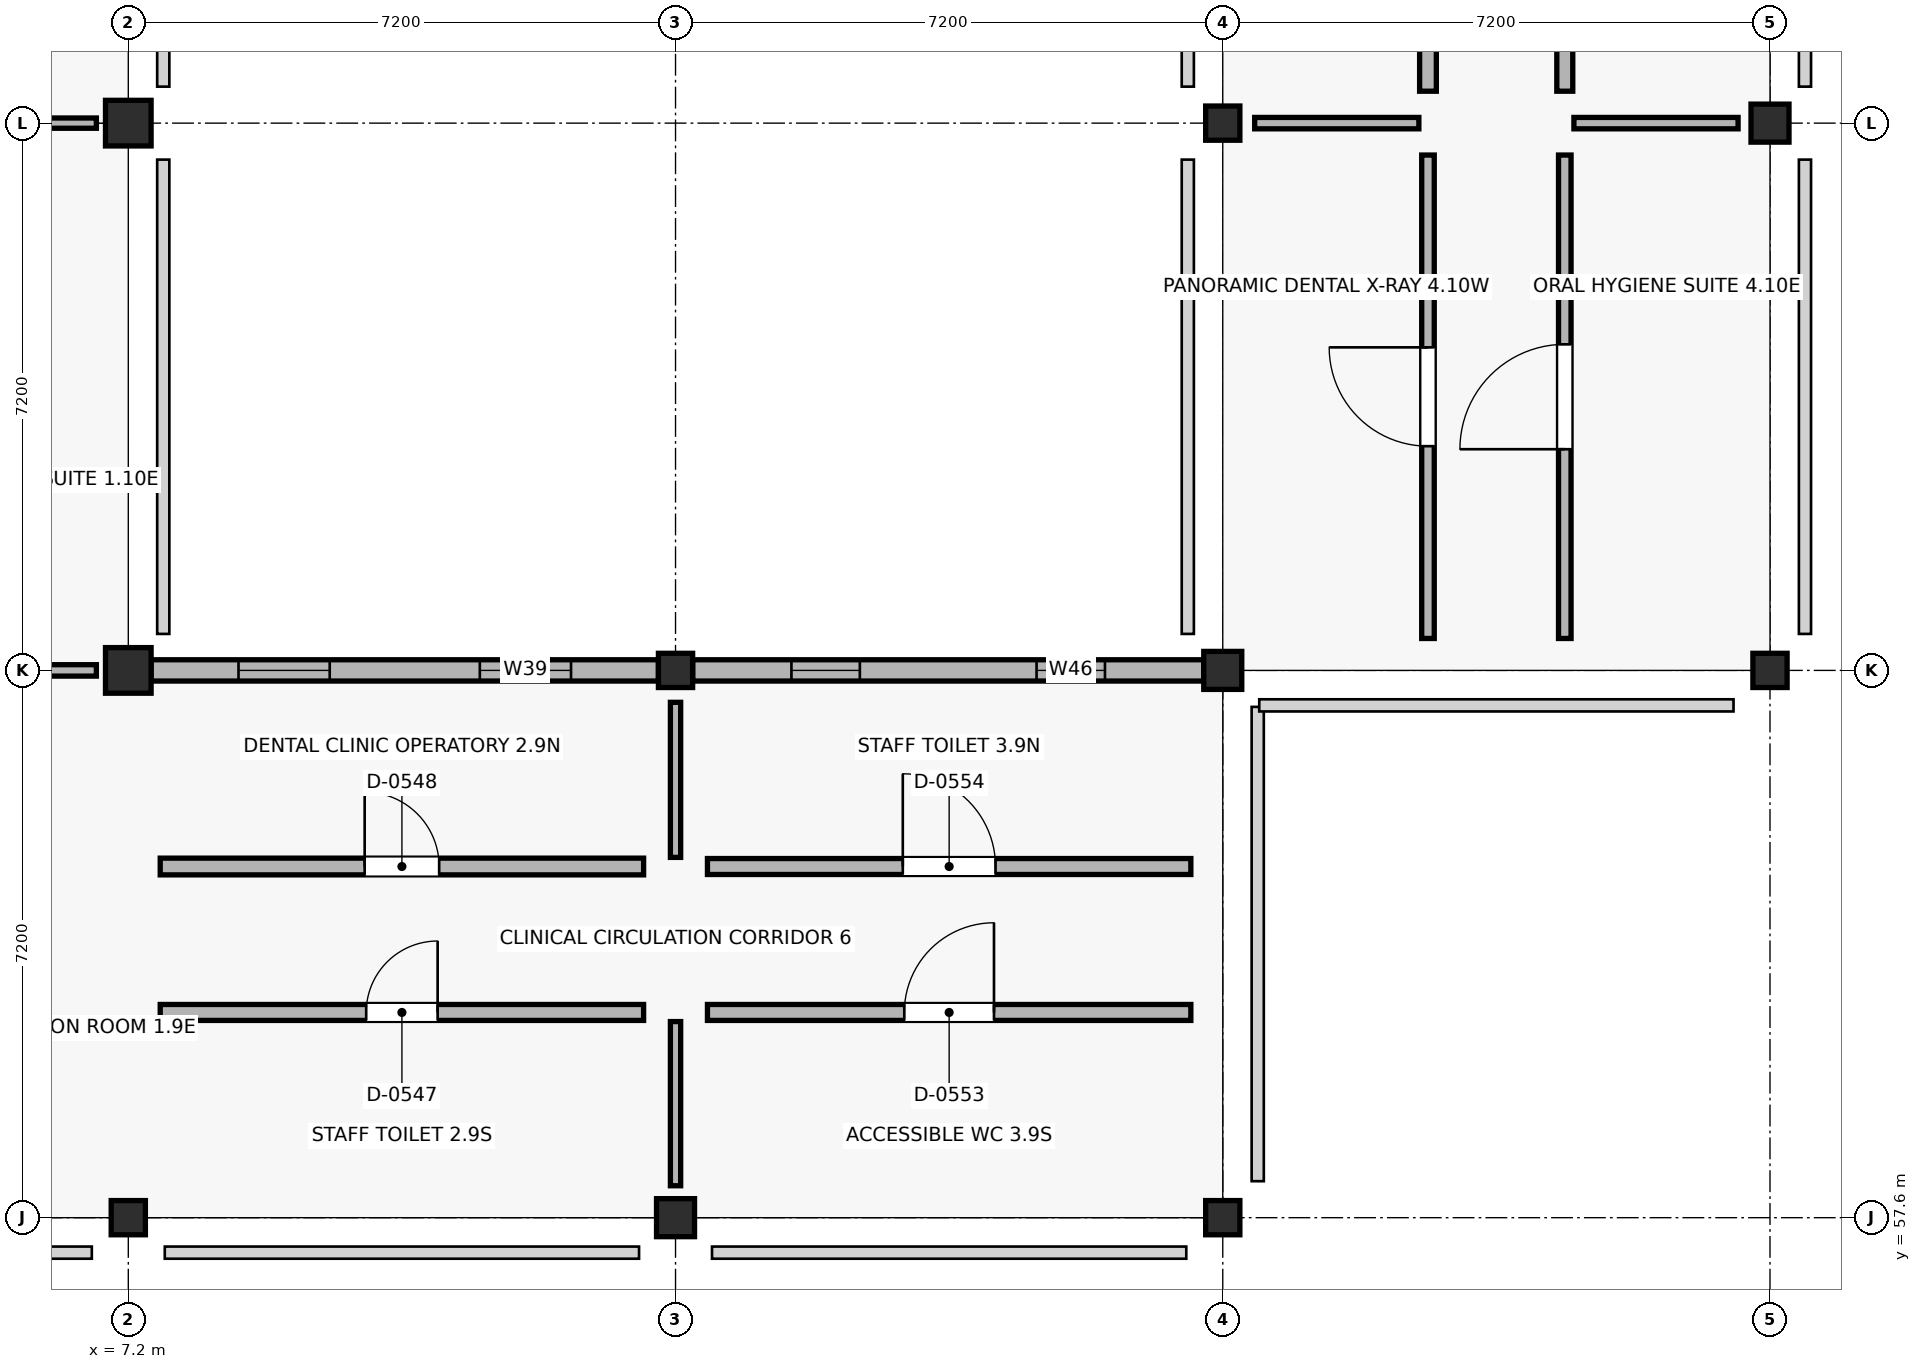
"""IFC4 building model, lengths in metres.
Left out: names, types, materials, properties, quantities, classifications, styles, units other than length and angle.
Written with IfcOpenShell. Run it as: python <this file> out.ifc"""

import sys

from ifc_helpers import new_model, si_unit, direction, frame, frame_2d, origin, origin_2d, place, context, subcontext, project, spatial, rectangle, extrude, element, fill, save


model = new_model("IFC4")
c1 = context("Model", 3, precision=1e-05, world=origin(), true_north=direction((0.0, 1.0)))
c2 = subcontext(c1, "Body", "Model", "MODEL_VIEW")
j1 = project(units=[si_unit("LENGTHUNIT", "METRE"), si_unit("PLANEANGLEUNIT", "RADIAN")], contexts=[c1])
p1 = place(None, origin())
s1 = spatial("IfcSite", under=j1, at=p1, CompositionType="ELEMENT")
p2 = place(p1, origin())
s2 = spatial("IfcBuilding", under=s1, at=p2, CompositionType="ELEMENT")
p3 = place(p2, frame((0.0, 0.0, 13.5)))
s3 = spatial("IfcBuildingStorey", under=s2, at=p3, CompositionType="ELEMENT", Elevation=13.5)
p4 = place(p3, frame((7.2, 57.6, 0.0), z_axis=(0.0, 0.0, 1.0), x_axis=(1.0, 0.0, 0.0)))
e1 = element("IfcColumn", 1, at=p4, inside=s3, PredefinedType="COLUMN", context=c2, shape_type="SweptSolid", body=[
    extrude(rectangle(XDim=0.45, YDim=0.45, at=origin_2d()), origin(), (0.0, 0.0, 1.0), 3.83),
])
for number, where, z_axis, x_axis in (
    (2, (7.2, 64.8, 0.0), (0.0, 0.0, 1.0), (1.0, 0.0, 0.0)),
    (3, (7.2, 72.0, 0.0), (0.0, 0.0, 1.0), (1.0, 0.0, 0.0)),
):
    element("IfcColumn", number, at=place(p3, frame(where, z_axis=z_axis, x_axis=x_axis)), inside=s3, PredefinedType="COLUMN", context=c2, shape_type="SweptSolid", body=[
        extrude(rectangle(XDim=0.6, YDim=0.6, at=origin_2d()), origin(), (0.0, 0.0, 1.0), 4.05),
    ])
p5 = place(p3, frame((14.4, 57.6, 0.0), z_axis=(0.0, 0.0, 1.0), x_axis=(1.0, 0.0, 0.0)))
e4 = element("IfcColumn", 4, at=p5, inside=s3, PredefinedType="COLUMN", context=c2, shape_type="SweptSolid", body=[
    extrude(rectangle(XDim=0.5, YDim=0.5, at=origin_2d()), origin(), (0.0, 0.0, 1.0), 3.83),
])
for number, where, z_axis, x_axis in (
    (5, (14.4, 64.8, 0.0), (0.0, 0.0, 1.0), (1.0, 0.0, 0.0)),
    (6, (21.6, 57.6, 0.0), (0.0, 0.0, 1.0), (1.0, 0.0, 0.0)),
):
    element("IfcColumn", number, at=place(p3, frame(where, z_axis=z_axis, x_axis=x_axis)), inside=s3, PredefinedType="COLUMN", context=c2, shape_type="SweptSolid", body=[
        extrude(rectangle(XDim=0.45, YDim=0.45, at=origin_2d()), origin(), (0.0, 0.0, 1.0), 3.83),
    ])
p6 = place(p3, frame((21.6, 64.8, 0.0), z_axis=(0.0, 0.0, 1.0), x_axis=(1.0, 0.0, 0.0)))
e7 = element("IfcColumn", 7, at=p6, inside=s3, PredefinedType="COLUMN", context=c2, shape_type="SweptSolid", body=[
    extrude(rectangle(XDim=0.5, YDim=0.5, at=origin_2d()), origin(), (0.0, 0.0, 1.0), 3.83),
])
for number, where, z_axis, x_axis in (
    (8, (21.6, 72.0, 0.0), (0.0, 0.0, 1.0), (1.0, 0.0, 0.0)),
    (9, (28.8, 64.8, 0.0), (0.0, 0.0, 1.0), (1.0, 0.0, 0.0)),
):
    element("IfcColumn", number, at=place(p3, frame(where, z_axis=z_axis, x_axis=x_axis)), inside=s3, PredefinedType="COLUMN", context=c2, shape_type="SweptSolid", body=[
        extrude(rectangle(XDim=0.45, YDim=0.45, at=origin_2d()), origin(), (0.0, 0.0, 1.0), 3.83),
    ])
p7 = place(p3, frame((28.8, 72.0, 0.0), z_axis=(0.0, 0.0, 1.0), x_axis=(1.0, 0.0, 0.0)))
e10 = element("IfcColumn", 10, at=p7, inside=s3, PredefinedType="COLUMN", context=c2, shape_type="SweptSolid", body=[
    extrude(rectangle(XDim=0.5, YDim=0.5, at=origin_2d()), origin(), (0.0, 0.0, 1.0), 3.83),
])
p8 = place(p3, frame((14.175, 64.8, 0.0), z_axis=(0.0, 0.0, 1.0), x_axis=(-1.0, 0.0, 0.0)))
e11 = element("IfcWall", 11, at=p8, inside=s3, PredefinedType="STANDARD", context=c2, shape_type="SweptSolid", body=[
    extrude(rectangle(XDim=6.675, YDim=0.28, at=frame_2d((3.337, 0.0))), origin(), (0.0, 0.0, 1.0), 3.14),
])
p9 = place(p8, frame((1.15, 0.0, 0.9)))
e12 = element("IfcOpeningElement", 12, at=p9, cuts=e11, PredefinedType="OPENING", context=c2, shape_type="SweptSolid", body=[
    extrude(rectangle(XDim=1.2, YDim=1.75, at=frame_2d((0.6, 0.875))), frame((0.0, 0.15, 0.0), z_axis=(0.0, -1.0, 0.0), x_axis=(1.0, 0.0, 0.0)), (0.0, 0.0, 1.0), 0.3),
])
p10 = place(p8, frame((4.325, 0.0, 0.9)))
e13 = element("IfcOpeningElement", 13, at=p10, cuts=e11, PredefinedType="OPENING", context=c2, shape_type="SweptSolid", body=[
    extrude(rectangle(XDim=1.2, YDim=1.75, at=frame_2d((0.6, 0.875))), frame((0.0, 0.15, 0.0), z_axis=(0.0, -1.0, 0.0), x_axis=(1.0, 0.0, 0.0)), (0.0, 0.0, 1.0), 0.3),
])
p11 = place(p3, frame((21.35, 64.8, 0.0), z_axis=(0.0, 0.0, 1.0), x_axis=(-1.0, 0.0, 0.0)))
e14 = element("IfcWall", 14, at=p11, inside=s3, PredefinedType="STANDARD", context=c2, shape_type="SweptSolid", body=[
    extrude(rectangle(XDim=6.725, YDim=0.28, at=frame_2d((3.363, 0.0))), origin(), (0.0, 0.0, 1.0), 3.14),
])
p12 = place(p11, frame((1.3, 0.0, 0.9)))
e15 = element("IfcOpeningElement", 15, at=p12, cuts=e14, PredefinedType="OPENING", context=c2, shape_type="SweptSolid", body=[
    extrude(rectangle(XDim=0.9, YDim=1.88, at=frame_2d((0.45, 0.94))), frame((0.0, 0.15, 0.0), z_axis=(0.0, -1.0, 0.0), x_axis=(1.0, 0.0, 0.0)), (0.0, 0.0, 1.0), 0.3),
])
p13 = place(p11, frame((4.525, 0.0, 0.9)))
e16 = element("IfcOpeningElement", 16, at=p13, cuts=e14, PredefinedType="OPENING", context=c2, shape_type="SweptSolid", body=[
    extrude(rectangle(XDim=0.9, YDim=1.88, at=frame_2d((0.45, 0.94))), frame((0.0, 0.15, 0.0), z_axis=(0.0, -1.0, 0.0), x_axis=(1.0, 0.0, 0.0)), (0.0, 0.0, 1.0), 0.3),
])
p14 = place(p3, frame((4.62, 64.8, 0.0), z_axis=(0.0, 0.0, 1.0), x_axis=(1.0, 0.0, 0.0)))
e17 = element("IfcWall", 17, at=p14, inside=s3, PredefinedType="PARTITIONING", context=c2, shape_type="SweptSolid", body=[
    extrude(rectangle(XDim=2.16, YDim=0.15, at=frame_2d((1.08, 0.0))), origin(), (0.0, 0.0, 1.0), 2.93),
])
p15 = place(p3, frame((4.62, 72.0, 0.0), z_axis=(0.0, 0.0, 1.0), x_axis=(1.0, 0.0, 0.0)))
e18 = element("IfcWall", 18, at=p15, inside=s3, PredefinedType="PARTITIONING", context=c2, shape_type="SweptSolid", body=[
    extrude(rectangle(XDim=2.16, YDim=0.135, at=frame_2d((1.08, 0.0))), origin(), (0.0, 0.0, 1.0), 2.93),
])
p16 = place(p3, frame((7.62, 60.3, 0.0), z_axis=(0.0, 0.0, 1.0), x_axis=(1.0, 0.0, 0.0)))
e19 = element("IfcWall", 19, at=p16, inside=s3, PredefinedType="PLUMBINGWALL", context=c2, shape_type="SweptSolid", body=[
    extrude(rectangle(XDim=6.36, YDim=0.21, at=frame_2d((3.18, 0.0))), origin(), (0.0, 0.0, 1.0), 2.93),
])
p17 = place(p16, frame((2.71, 0.0, 0.0)))
e20 = element("IfcOpeningElement", 20, at=p17, cuts=e19, PredefinedType="OPENING", context=c2, shape_type="SweptSolid", body=[
    extrude(rectangle(XDim=0.94, YDim=2.19, at=frame_2d((0.47, 1.095))), frame((0.0, 0.115, 0.0), z_axis=(0.0, -1.0, 0.0), x_axis=(1.0, 0.0, 0.0)), (0.0, 0.0, 1.0), 0.23),
])
p18 = place(p3, frame((14.4, 58.02, 0.0), z_axis=(0.0, 0.0, 1.0), x_axis=(0.0, 1.0, 0.0)))
e21 = element("IfcWall", 21, at=p18, inside=s3, PredefinedType="PARTITIONING", context=c2, shape_type="SweptSolid", body=[
    extrude(rectangle(XDim=2.16, YDim=0.135, at=frame_2d((1.08, 0.0))), origin(), (0.0, 0.0, 1.0), 2.93),
])
p19 = place(p3, frame((7.62, 62.22, 0.0), z_axis=(0.0, 0.0, 1.0), x_axis=(1.0, 0.0, 0.0)))
e22 = element("IfcWall", 22, at=p19, inside=s3, PredefinedType="SOLIDWALL", context=c2, shape_type="SweptSolid", body=[
    extrude(rectangle(XDim=6.36, YDim=0.22, at=frame_2d((3.18, 0.0))), origin(), (0.0, 0.0, 1.0), 2.93),
])
p20 = place(p19, frame((2.69, 0.0, 0.0)))
e23 = element("IfcOpeningElement", 23, at=p20, cuts=e22, PredefinedType="OPENING", context=c2, shape_type="SweptSolid", body=[
    extrude(rectangle(XDim=0.98, YDim=2.19, at=frame_2d((0.49, 1.095))), frame((0.0, 0.12, 0.0), z_axis=(0.0, -1.0, 0.0), x_axis=(1.0, 0.0, 0.0)), (0.0, 0.0, 1.0), 0.24),
])
p21 = place(p3, frame((14.4, 62.34, 0.0), z_axis=(0.0, 0.0, 1.0), x_axis=(0.0, 1.0, 0.0)))
e24 = element("IfcWall", 24, at=p21, inside=s3, PredefinedType="PARTITIONING", context=c2, shape_type="SweptSolid", body=[
    extrude(rectangle(XDim=2.04, YDim=0.135, at=frame_2d((1.02, 0.0))), origin(), (0.0, 0.0, 1.0), 2.93),
])
p22 = place(p3, frame((14.82, 60.3, 0.0), z_axis=(0.0, 0.0, 1.0), x_axis=(1.0, 0.0, 0.0)))
e25 = element("IfcWall", 25, at=p22, inside=s3, PredefinedType="PLUMBINGWALL", context=c2, shape_type="SweptSolid", body=[
    extrude(rectangle(XDim=6.36, YDim=0.21, at=frame_2d((3.18, 0.0))), origin(), (0.0, 0.0, 1.0), 2.93),
])
p23 = place(p22, frame((2.59, 0.0, 0.0)))
e26 = element("IfcOpeningElement", 26, at=p23, cuts=e25, PredefinedType="OPENING", context=c2, shape_type="SweptSolid", body=[
    extrude(rectangle(XDim=1.18, YDim=2.19, at=frame_2d((0.59, 1.095))), frame((0.0, 0.115, 0.0), z_axis=(0.0, -1.0, 0.0), x_axis=(1.0, 0.0, 0.0)), (0.0, 0.0, 1.0), 0.23),
])
p24 = place(p3, frame((14.82, 62.22, 0.0), z_axis=(0.0, 0.0, 1.0), x_axis=(1.0, 0.0, 0.0)))
e27 = element("IfcWall", 27, at=p24, inside=s3, PredefinedType="PLUMBINGWALL", context=c2, shape_type="SweptSolid", body=[
    extrude(rectangle(XDim=6.36, YDim=0.21, at=frame_2d((3.18, 0.0))), origin(), (0.0, 0.0, 1.0), 2.93),
])
p25 = place(p24, frame((2.57, 0.0, 0.0)))
e28 = element("IfcOpeningElement", 28, at=p25, cuts=e27, PredefinedType="OPENING", context=c2, shape_type="SweptSolid", body=[
    extrude(rectangle(XDim=1.22, YDim=2.19, at=frame_2d((0.61, 1.095))), frame((0.0, 0.115, 0.0), z_axis=(0.0, -1.0, 0.0), x_axis=(1.0, 0.0, 0.0)), (0.0, 0.0, 1.0), 0.23),
])
p26 = place(p3, frame((24.3, 65.22, 0.0), z_axis=(0.0, 0.0, 1.0), x_axis=(0.0, 1.0, 0.0)))
e29 = element("IfcWall", 29, at=p26, inside=s3, PredefinedType="PARTITIONING", context=c2, shape_type="SweptSolid", body=[
    extrude(rectangle(XDim=6.36, YDim=0.165, at=frame_2d((3.18, 0.0))), origin(), (0.0, 0.0, 1.0), 2.93),
])
p27 = place(p26, frame((2.53, 0.0, 0.0)))
e30 = element("IfcOpeningElement", 30, at=p27, cuts=e29, PredefinedType="OPENING", context=c2, shape_type="SweptSolid", body=[
    extrude(rectangle(XDim=1.3, YDim=2.15, at=frame_2d((0.65, 1.075))), frame((0.0, 0.093, 0.0), z_axis=(0.0, -1.0, 0.0), x_axis=(1.0, 0.0, 0.0)), (0.0, 0.0, 1.0), 0.185),
])
p28 = place(p3, frame((22.02, 72.0, 0.0), z_axis=(0.0, 0.0, 1.0), x_axis=(1.0, 0.0, 0.0)))
e31 = element("IfcWall", 31, at=p28, inside=s3, PredefinedType="PARTITIONING", context=c2, shape_type="SweptSolid", body=[
    extrude(rectangle(XDim=2.16, YDim=0.15, at=frame_2d((1.08, 0.0))), origin(), (0.0, 0.0, 1.0), 2.93),
])
p29 = place(p3, frame((26.1, 65.22, 0.0), z_axis=(0.0, 0.0, 1.0), x_axis=(0.0, 1.0, 0.0)))
e32 = element("IfcWall", 32, at=p29, inside=s3, PredefinedType="PARTITIONING", context=c2, shape_type="SweptSolid", body=[
    extrude(rectangle(XDim=6.36, YDim=0.165, at=frame_2d((3.18, 0.0))), origin(), (0.0, 0.0, 1.0), 2.93),
])
p30 = place(p29, frame((2.49, 0.0, 0.0)))
e33 = element("IfcOpeningElement", 33, at=p30, cuts=e32, PredefinedType="OPENING", context=c2, shape_type="SweptSolid", body=[
    extrude(rectangle(XDim=1.38, YDim=2.19, at=frame_2d((0.69, 1.095))), frame((0.0, 0.093, 0.0), z_axis=(0.0, -1.0, 0.0), x_axis=(1.0, 0.0, 0.0)), (0.0, 0.0, 1.0), 0.185),
])
p31 = place(p3, frame((26.22, 72.0, 0.0), z_axis=(0.0, 0.0, 1.0), x_axis=(1.0, 0.0, 0.0)))
e34 = element("IfcWall", 34, at=p31, inside=s3, PredefinedType="PARTITIONING", context=c2, shape_type="SweptSolid", body=[
    extrude(rectangle(XDim=2.16, YDim=0.15, at=frame_2d((1.08, 0.0))), origin(), (0.0, 0.0, 1.0), 2.93),
])
p32 = place(p3, frame((24.3, 72.42, 0.0), z_axis=(0.0, 0.0, 1.0), x_axis=(0.0, 1.0, 0.0)))
e35 = element("IfcWall", 35, at=p32, inside=s3, PredefinedType="SOLIDWALL", context=c2, shape_type="SweptSolid", body=[
    extrude(rectangle(XDim=6.36, YDim=0.22, at=frame_2d((3.18, 0.0))), origin(), (0.0, 0.0, 1.0), 2.93),
])
p33 = place(p32, frame((2.47, 0.0, 0.0)))
e36 = element("IfcOpeningElement", 36, at=p33, cuts=e35, PredefinedType="OPENING", context=c2, shape_type="SweptSolid", body=[
    extrude(rectangle(XDim=1.42, YDim=2.19, at=frame_2d((0.71, 1.095))), frame((0.0, 0.12, 0.0), z_axis=(0.0, -1.0, 0.0), x_axis=(1.0, 0.0, 0.0)), (0.0, 0.0, 1.0), 0.24),
])
p34 = place(p3, frame((26.1, 72.42, 0.0), z_axis=(0.0, 0.0, 1.0), x_axis=(0.0, 1.0, 0.0)))
e37 = element("IfcWall", 37, at=p34, inside=s3, PredefinedType="PLUMBINGWALL", context=c2, shape_type="SweptSolid", body=[
    extrude(rectangle(XDim=6.36, YDim=0.21, at=frame_2d((3.18, 0.0))), origin(), (0.0, 0.0, 1.0), 2.93),
])
p35 = place(p34, frame((2.45, 0.0, 0.0)))
e38 = element("IfcOpeningElement", 38, at=p35, cuts=e37, PredefinedType="OPENING", context=c2, shape_type="SweptSolid", body=[
    extrude(rectangle(XDim=1.46, YDim=2.19, at=frame_2d((0.73, 1.095))), frame((0.0, 0.115, 0.0), z_axis=(0.0, -1.0, 0.0), x_axis=(1.0, 0.0, 0.0)), (0.0, 0.0, 1.0), 0.23),
])
p36 = place(p9, origin())
e39 = element("IfcWindow", 39, at=p36, inside=s3, PartitioningType="SINGLE_PANEL", PredefinedType="WINDOW", context=c2, shape_type="SweptSolid", body=[
    extrude(rectangle(XDim=1.2, YDim=1.75, at=frame_2d((0.6, 0.875))), frame((0.0, 0.03, 0.0), z_axis=(0.0, -1.0, 0.0), x_axis=(1.0, 0.0, 0.0)), (0.0, 0.0, 1.0), 0.06),
])
fill(e12, e39)
p37 = place(p10, origin())
e40 = element("IfcWindow", 40, at=p37, inside=s3, PartitioningType="SINGLE_PANEL", PredefinedType="WINDOW", context=c2, shape_type="SweptSolid", body=[
    extrude(rectangle(XDim=1.2, YDim=1.75, at=frame_2d((0.6, 0.875))), frame((0.0, 0.03, 0.0), z_axis=(0.0, -1.0, 0.0), x_axis=(1.0, 0.0, 0.0)), (0.0, 0.0, 1.0), 0.06),
])
fill(e13, e40)
p38 = place(p12, origin())
e41 = element("IfcWindow", 41, at=p38, inside=s3, PartitioningType="SINGLE_PANEL", PredefinedType="WINDOW", context=c2, shape_type="SweptSolid", body=[
    extrude(rectangle(XDim=0.9, YDim=1.88, at=frame_2d((0.45, 0.94))), frame((0.0, 0.03, 0.0), z_axis=(0.0, -1.0, 0.0), x_axis=(1.0, 0.0, 0.0)), (0.0, 0.0, 1.0), 0.06),
])
fill(e15, e41)
p39 = place(p13, origin())
e42 = element("IfcWindow", 42, at=p39, inside=s3, PartitioningType="SINGLE_PANEL", PredefinedType="WINDOW", context=c2, shape_type="SweptSolid", body=[
    extrude(rectangle(XDim=0.9, YDim=1.88, at=frame_2d((0.45, 0.94))), frame((0.0, 0.03, 0.0), z_axis=(0.0, -1.0, 0.0), x_axis=(1.0, 0.0, 0.0)), (0.0, 0.0, 1.0), 0.06),
])
fill(e16, e42)
p40 = place(p17, origin())
e43 = element("IfcDoor", 43, at=p40, inside=s3, OperationType="SINGLE_SWING_RIGHT", PredefinedType="DOOR", context=c2, shape_type="SweptSolid", body=[
    extrude(rectangle(XDim=0.94, YDim=2.19, at=frame_2d((0.47, 1.095))), frame((0.0, 0.025, 0.0), z_axis=(0.0, -1.0, 0.0), x_axis=(1.0, 0.0, 0.0)), (0.0, 0.0, 1.0), 0.05),
])
fill(e20, e43)
p41 = place(p20, origin())
e44 = element("IfcDoor", 44, at=p41, inside=s3, OperationType="SINGLE_SWING_LEFT", PredefinedType="DOOR", context=c2, shape_type="SweptSolid", body=[
    extrude(rectangle(XDim=0.98, YDim=2.19, at=frame_2d((0.49, 1.095))), frame((0.0, 0.025, 0.0), z_axis=(0.0, -1.0, 0.0), x_axis=(1.0, 0.0, 0.0)), (0.0, 0.0, 1.0), 0.05),
])
fill(e23, e44)
p42 = place(p23, origin())
e45 = element("IfcDoor", 45, at=p42, inside=s3, OperationType="SINGLE_SWING_RIGHT", PredefinedType="DOOR", context=c2, shape_type="SweptSolid", body=[
    extrude(rectangle(XDim=1.18, YDim=2.19, at=frame_2d((0.59, 1.095))), frame((0.0, 0.025, 0.0), z_axis=(0.0, -1.0, 0.0), x_axis=(1.0, 0.0, 0.0)), (0.0, 0.0, 1.0), 0.05),
])
fill(e26, e45)
p43 = place(p25, origin())
e46 = element("IfcDoor", 46, at=p43, inside=s3, OperationType="SINGLE_SWING_LEFT", PredefinedType="DOOR", context=c2, shape_type="SweptSolid", body=[
    extrude(rectangle(XDim=1.22, YDim=2.19, at=frame_2d((0.61, 1.095))), frame((0.0, 0.025, 0.0), z_axis=(0.0, -1.0, 0.0), x_axis=(1.0, 0.0, 0.0)), (0.0, 0.0, 1.0), 0.05),
])
fill(e28, e46)
p44 = place(p27, origin())
e47 = element("IfcDoor", 47, at=p44, inside=s3, OperationType="SINGLE_SWING_RIGHT", PredefinedType="DOOR", context=c2, shape_type="SweptSolid", body=[
    extrude(rectangle(XDim=1.3, YDim=2.15, at=frame_2d((0.65, 1.075))), frame((0.0, 0.025, 0.0), z_axis=(0.0, -1.0, 0.0), x_axis=(1.0, 0.0, 0.0)), (0.0, 0.0, 1.0), 0.05),
])
fill(e30, e47)
p45 = place(p30, origin())
e48 = element("IfcDoor", 48, at=p45, inside=s3, OperationType="SINGLE_SWING_LEFT", PredefinedType="DOOR", context=c2, shape_type="SweptSolid", body=[
    extrude(rectangle(XDim=1.38, YDim=2.19, at=frame_2d((0.69, 1.095))), frame((0.0, 0.025, 0.0), z_axis=(0.0, -1.0, 0.0), x_axis=(1.0, 0.0, 0.0)), (0.0, 0.0, 1.0), 0.05),
])
fill(e33, e48)
save(model, sys.argv[1])
